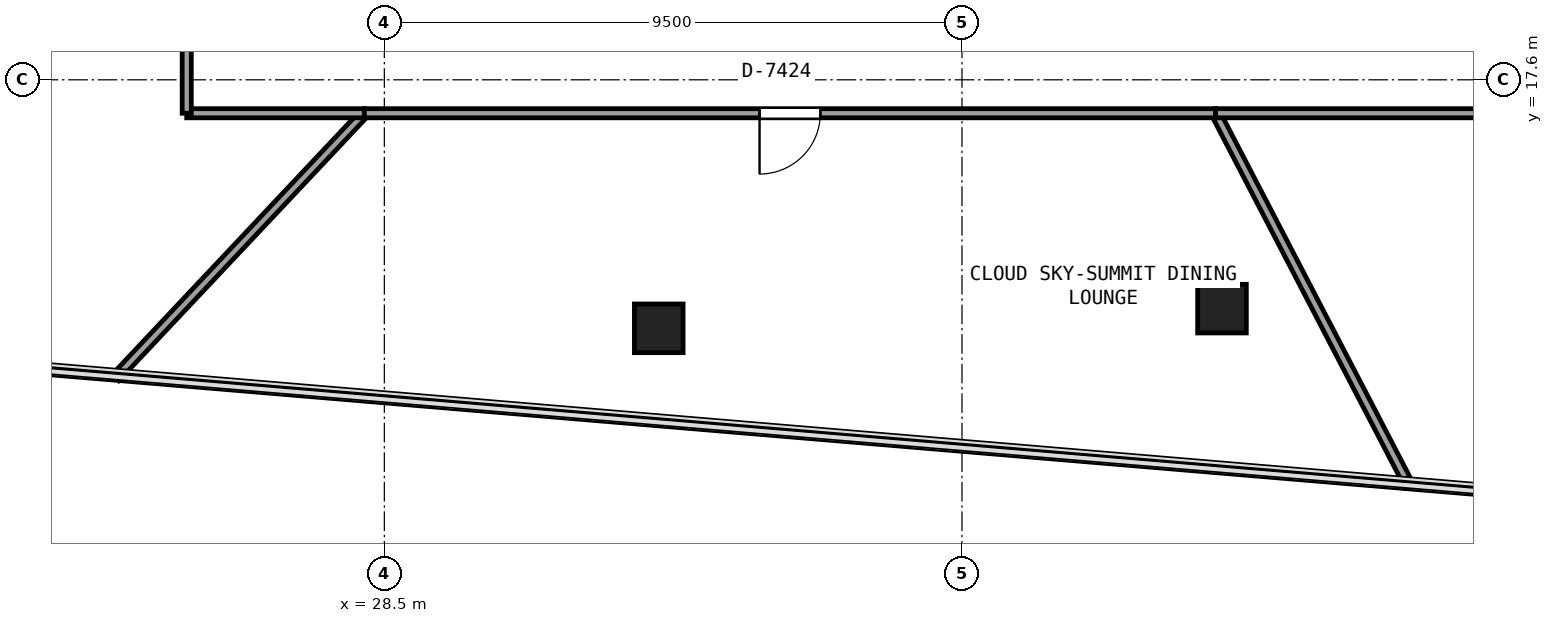
"""IFC4 building model, lengths in metres.
Left out: names, types, materials, properties, quantities, classifications, styles, units other than length and angle.
Written with IfcOpenShell. Run it as: python <this file> out.ifc"""

import sys

from ifc_helpers import new_model, si_unit, direction, frame, frame_2d, origin, origin_2d, place, context, subcontext, project, spatial, rectangle, extrude, element, fill, save


model = new_model("IFC4")
c1 = context("Model", 3, precision=1e-05, world=origin(), true_north=direction((0.0, 1.0)))
c2 = subcontext(c1, "Body", "Model", "MODEL_VIEW")
j1 = project(units=[si_unit("LENGTHUNIT", "METRE"), si_unit("PLANEANGLEUNIT", "RADIAN")], contexts=[c1])
p1 = place(None, origin())
s1 = spatial("IfcSite", under=j1, at=p1, CompositionType="ELEMENT")
p2 = place(p1, origin())
s2 = spatial("IfcBuilding", under=s1, at=p2, CompositionType="ELEMENT")
p3 = place(p2, frame((0.0, 0.0, 275.1)))
s3 = spatial("IfcBuildingStorey", under=s2, at=p3, CompositionType="ELEMENT", Elevation=275.1)
for number, where, z_axis, x_axis in (
    (1, (33.013, 13.513, 0.0), (0.0, 0.0, 1.0), (1.0, 0.0, 0.0)),
    (2, (42.276, 13.837, 0.0), (0.0, 0.0, 1.0), (1.0, 0.0, 0.0)),
):
    element("IfcColumn", number, at=place(p3, frame(where, z_axis=z_axis, x_axis=x_axis)), inside=s3, PredefinedType="COLUMN", context=c2, shape_type="SweptSolid", body=[
        extrude(rectangle(XDim=0.8, YDim=0.8, at=origin_2d()), origin(), (0.0, 0.0, 1.0), 3.92),
    ])
p4 = place(p3, frame((24.077, 12.702, 0.0), z_axis=(0.0, 0.0, 1.0), x_axis=(0.685508776542, 0.728064363421, 0.0)))
e3 = element("IfcWall", 3, at=p4, inside=s3, PredefinedType="PARTITIONING", context=c2, shape_type="SweptSolid", body=[
    extrude(rectangle(XDim=5.972, YDim=0.15, at=frame_2d((2.986, 0.0))), origin(), (0.0, 0.0, 1.0), 3.92),
])
p5 = place(p3, frame((28.171, 17.05, 0.0), z_axis=(0.0, 0.0, 1.0), x_axis=(-1.0, 0.0, 0.0)))
e4 = element("IfcWall", 4, at=p5, inside=s3, PredefinedType="PARTITIONING", context=c2, shape_type="SweptSolid", body=[
    extrude(rectangle(XDim=2.921, YDim=0.15, at=frame_2d((1.46, 0.0))), origin(), (0.0, 0.0, 1.0), 3.92),
])
p6 = place(p3, frame((25.25, 17.05, 0.0), z_axis=(0.0, 0.0, 1.0), x_axis=(0.0, 1.0, 0.0)))
e5 = element("IfcWall", 5, at=p6, inside=s3, PredefinedType="PARTITIONING", context=c2, shape_type="SweptSolid", body=[
    extrude(rectangle(XDim=15.178, YDim=0.15, at=frame_2d((7.589, 0.0))), origin(), (0.0, 0.0, 1.0), 3.365),
])
p7 = place(p6, frame((7.089, 0.0, 0.0)))
e6 = element("IfcOpeningElement", 6, at=p7, cuts=e5, PredefinedType="OPENING", context=c2, shape_type="SweptSolid", body=[
    extrude(rectangle(XDim=1.0, YDim=2.15, at=frame_2d((0.5, 1.075))), frame((0.0, 0.085, 0.0), z_axis=(0.0, -1.0, 0.0), x_axis=(1.0, 0.0, 0.0)), (0.0, 0.0, 1.0), 0.17),
])
p8 = place(p3, frame((45.358, 10.921, 0.0), z_axis=(0.0, 0.0, 1.0), x_axis=(-0.461336045476, 0.887225480441, 0.0)))
e7 = element("IfcWall", 7, at=p8, inside=s3, PredefinedType="PARTITIONING", context=c2, shape_type="SweptSolid", body=[
    extrude(rectangle(XDim=6.908, YDim=0.15, at=frame_2d((3.454, 0.0))), origin(), (0.0, 0.0, 1.0), 3.445),
])
p9 = place(p3, frame((42.171, 17.05, 0.0), z_axis=(0.0, 0.0, 1.0), x_axis=(-1.0, 0.0, 0.0)))
e8 = element("IfcWall", 8, at=p9, inside=s3, PredefinedType="PARTITIONING", context=c2, shape_type="SweptSolid", body=[
    extrude(rectangle(XDim=14.0, YDim=0.15, at=frame_2d((7.0, 0.0))), origin(), (0.0, 0.0, 1.0), 3.365),
])
p10 = place(p9, frame((6.5, 0.0, 0.0)))
e9 = element("IfcOpeningElement", 9, at=p10, cuts=e8, PredefinedType="OPENING", context=c2, shape_type="SweptSolid", body=[
    extrude(rectangle(XDim=1.0, YDim=2.15, at=frame_2d((0.5, 1.075))), frame((0.0, 0.085, 0.0), z_axis=(0.0, -1.0, 0.0), x_axis=(1.0, 0.0, 0.0)), (0.0, 0.0, 1.0), 0.17),
])
p11 = place(p3, frame((49.15, 17.05, 0.0), z_axis=(0.0, 0.0, 1.0), x_axis=(-1.0, 0.0, 0.0)))
e10 = element("IfcWall", 10, at=p11, inside=s3, PredefinedType="PARTITIONING", context=c2, shape_type="SweptSolid", body=[
    extrude(rectangle(XDim=6.979, YDim=0.15, at=frame_2d((3.49, 0.0))), origin(), (0.0, 0.0, 1.0), 3.445),
])
p12 = place(p10, origin())
e11 = element("IfcDoor", 11, at=p12, inside=s3, OperationType="SINGLE_SWING_RIGHT", PredefinedType="DOOR", context=c2, shape_type="SweptSolid", body=[
    extrude(rectangle(XDim=1.0, YDim=2.15, at=frame_2d((0.5, 1.075))), frame((0.0, 0.025, 0.0), z_axis=(0.0, -1.0, 0.0), x_axis=(1.0, 0.0, 0.0)), (0.0, 0.0, 1.0), 0.05),
])
fill(e9, e11)
save(model, sys.argv[1])
